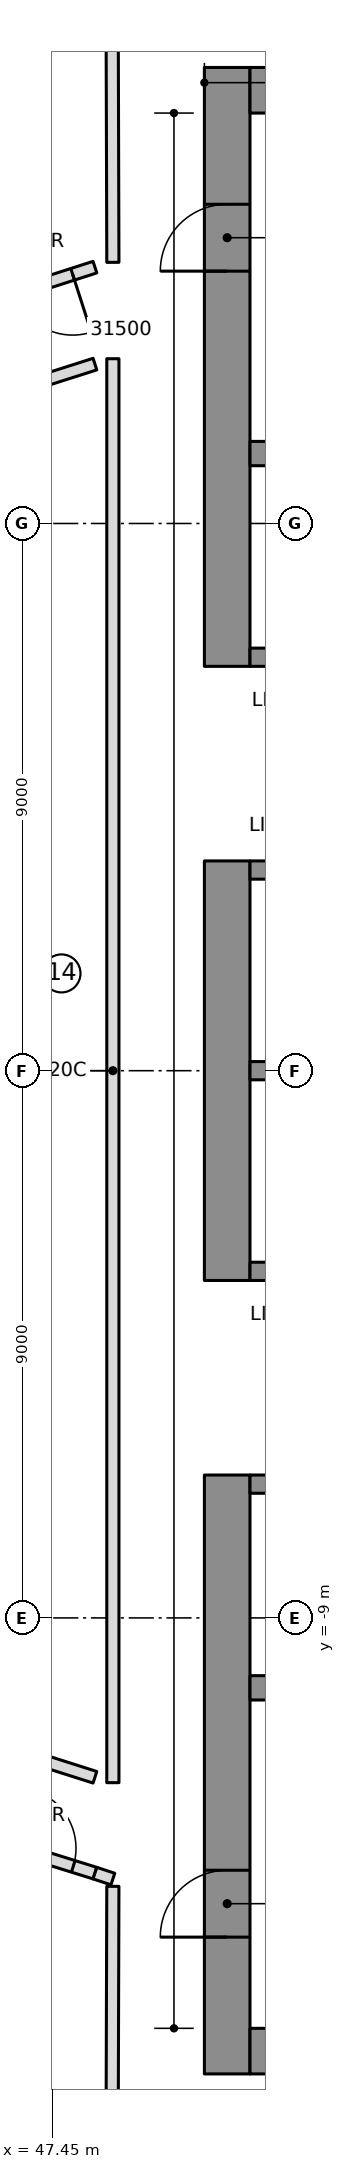
"""IFC4 building model, lengths in metres.
Left out: names, types, materials, properties, quantities, classifications, styles, units other than length and angle.
Written with IfcOpenShell. Run it as: python <this file> out.ifc"""

import sys

from ifc_helpers import new_model, si_unit, direction, frame, frame_2d, origin, place, context, subcontext, project, spatial, rectangle, extrude, element, fill, save


model = new_model("IFC4")
c1 = context("Model", 3, precision=1e-05, world=origin(), true_north=direction((0.0, 1.0)))
c2 = subcontext(c1, "Body", "Model", "MODEL_VIEW")
j1 = project(units=[si_unit("LENGTHUNIT", "METRE"), si_unit("PLANEANGLEUNIT", "RADIAN")], contexts=[c1])
p1 = place(None, origin())
s1 = spatial("IfcSite", under=j1, at=p1, CompositionType="ELEMENT")
p2 = place(p1, origin())
s2 = spatial("IfcBuilding", under=s1, at=p2, CompositionType="ELEMENT")
p3 = place(p2, frame((0.0, 0.0, 196.8)))
s3 = spatial("IfcBuildingStorey", under=s2, at=p3, CompositionType="ELEMENT", Elevation=196.8)
p4 = place(p3, frame((50.325, 6.65, 0.0), z_axis=(0.0, 0.0, 1.0), x_axis=(0.0, 1.0, 0.0)))
e1 = element("IfcWall", 1, at=p4, inside=s3, PredefinedType="SHEAR", context=c2, shape_type="SweptSolid", body=[
    extrude(rectangle(XDim=9.85, YDim=0.75, at=frame_2d((4.925, 0.0))), origin(), (0.0, 0.0, 1.0), 3.55),
])
p5 = place(p4, frame((6.5, 0.0, 0.0)))
e2 = element("IfcOpeningElement", 2, at=p5, cuts=e1, PredefinedType="OPENING", context=c2, shape_type="SweptSolid", body=[
    extrude(rectangle(XDim=1.1, YDim=2.1, at=frame_2d((0.55, 1.05))), frame((0.0, 0.385, 0.0), z_axis=(0.0, -1.0, 0.0), x_axis=(1.0, 0.0, 0.0)), (0.0, 0.0, 1.0), 0.77),
])
p6 = place(p3, frame((50.325, -3.45, 0.0), z_axis=(0.0, 0.0, 1.0), x_axis=(0.0, 1.0, 0.0)))
e3 = element("IfcWall", 3, at=p6, inside=s3, PredefinedType="SHEAR", context=c2, shape_type="SweptSolid", body=[
    extrude(rectangle(XDim=6.9, YDim=0.75, at=frame_2d((3.45, 0.0))), origin(), (0.0, 0.0, 1.0), 3.55),
])
p7 = place(p3, frame((50.325, -16.5, 0.0), z_axis=(0.0, 0.0, 1.0), x_axis=(0.0, 1.0, 0.0)))
e4 = element("IfcWall", 4, at=p7, inside=s3, PredefinedType="SHEAR", context=c2, shape_type="SweptSolid", body=[
    extrude(rectangle(XDim=9.85, YDim=0.75, at=frame_2d((4.925, 0.0))), origin(), (0.0, 0.0, 1.0), 3.55),
])
p8 = place(p7, frame((2.25, 0.0, 0.0)))
e5 = element("IfcOpeningElement", 5, at=p8, cuts=e4, PredefinedType="OPENING", context=c2, shape_type="SweptSolid", body=[
    extrude(rectangle(XDim=1.1, YDim=2.1, at=frame_2d((0.55, 1.05))), frame((0.0, 0.385, 0.0), z_axis=(0.0, -1.0, 0.0), x_axis=(1.0, 0.0, 0.0)), (0.0, 0.0, 1.0), 0.77),
])
for number, where, z_axis, x_axis in (
    (6, (50.7, 16.125, 0.0), (0.0, 0.0, 1.0), (1.0, 0.0, 0.0)),
    (7, (50.7, -16.125, 0.0), (0.0, 0.0, 1.0), (1.0, 0.0, 0.0)),
):
    element("IfcWall", number, at=place(p3, frame(where, z_axis=z_axis, x_axis=x_axis)), inside=s3, PredefinedType="SHEAR", context=c2, shape_type="SweptSolid", body=[
        extrude(rectangle(XDim=13.77, YDim=0.75, at=frame_2d((6.885, 0.0))), origin(), (0.0, 0.0, 1.0), 3.55),
    ])
p9 = place(p3, frame((50.7, 10.15, 0.0), z_axis=(0.0, 0.0, 1.0), x_axis=(1.0, 0.0, 0.0)))
e8 = element("IfcWall", 8, at=p9, inside=s3, PredefinedType="SHEAR", context=c2, shape_type="SweptSolid", body=[
    extrude(rectangle(XDim=13.02, YDim=0.4, at=frame_2d((6.51, 0.0))), origin(), (0.0, 0.0, 1.0), 3.55),
])
p10 = place(p9, frame((0.7, 0.0, 0.0)))
e9 = element("IfcOpeningElement", 9, at=p10, cuts=e8, PredefinedType="OPENING", context=c2, shape_type="SweptSolid", body=[
    extrude(rectangle(XDim=1.1, YDim=2.1, at=frame_2d((0.55, 1.05))), frame((0.0, 0.21, 0.0), z_axis=(0.0, -1.0, 0.0), x_axis=(1.0, 0.0, 0.0)), (0.0, 0.0, 1.0), 0.42),
])
p11 = place(p9, frame((3.5, 0.0, 0.0)))
e10 = element("IfcOpeningElement", 10, at=p11, cuts=e8, PredefinedType="OPENING", context=c2, shape_type="SweptSolid", body=[
    extrude(rectangle(XDim=1.1, YDim=2.1, at=frame_2d((0.55, 1.05))), frame((0.0, 0.21, 0.0), z_axis=(0.0, -1.0, 0.0), x_axis=(1.0, 0.0, 0.0)), (0.0, 0.0, 1.0), 0.42),
])
p12 = place(p3, frame((50.7, -10.15, 0.0), z_axis=(0.0, 0.0, 1.0), x_axis=(1.0, 0.0, 0.0)))
e11 = element("IfcWall", 11, at=p12, inside=s3, PredefinedType="SHEAR", context=c2, shape_type="SweptSolid", body=[
    extrude(rectangle(XDim=13.02, YDim=0.4, at=frame_2d((6.51, 0.0))), origin(), (0.0, 0.0, 1.0), 3.55),
])
p13 = place(p3, frame((50.7, 0.0, 0.0), z_axis=(0.0, 0.0, 1.0), x_axis=(1.0, 0.0, 0.0)))
e12 = element("IfcWall", 12, at=p13, inside=s3, PredefinedType="SHEAR", context=c2, shape_type="SweptSolid", body=[
    extrude(rectangle(XDim=10.9, YDim=0.3, at=frame_2d((5.45, 0.0))), origin(), (0.0, 0.0, 1.0), 3.55),
])
p14 = place(p3, frame((50.7, 3.3, 0.0), z_axis=(0.0, 0.0, 1.0), x_axis=(1.0, 0.0, 0.0)))
e13 = element("IfcWall", 13, at=p14, inside=s3, PredefinedType="SHEAR", context=c2, shape_type="SweptSolid", body=[
    extrude(rectangle(XDim=10.9, YDim=0.3, at=frame_2d((5.45, 0.0))), origin(), (0.0, 0.0, 1.0), 3.55),
])
p15 = place(p14, frame((0.7, 0.0, 0.0)))
e14 = element("IfcOpeningElement", 14, at=p15, cuts=e13, PredefinedType="OPENING", context=c2, shape_type="SweptSolid", body=[
    extrude(rectangle(XDim=1.1, YDim=2.1, at=frame_2d((0.55, 1.05))), frame((0.0, 0.16, 0.0), z_axis=(0.0, -1.0, 0.0), x_axis=(1.0, 0.0, 0.0)), (0.0, 0.0, 1.0), 0.32),
])
p16 = place(p14, frame((3.5, 0.0, 0.0)))
e15 = element("IfcOpeningElement", 15, at=p16, cuts=e13, PredefinedType="OPENING", context=c2, shape_type="SweptSolid", body=[
    extrude(rectangle(XDim=1.1, YDim=2.1, at=frame_2d((0.55, 1.05))), frame((0.0, 0.16, 0.0), z_axis=(0.0, -1.0, 0.0), x_axis=(1.0, 0.0, 0.0)), (0.0, 0.0, 1.0), 0.32),
])
p17 = place(p14, frame((6.3, 0.0, 0.0)))
e16 = element("IfcOpeningElement", 16, at=p17, cuts=e13, PredefinedType="OPENING", context=c2, shape_type="SweptSolid", body=[
    extrude(rectangle(XDim=1.1, YDim=2.1, at=frame_2d((0.55, 1.05))), frame((0.0, 0.16, 0.0), z_axis=(0.0, -1.0, 0.0), x_axis=(1.0, 0.0, 0.0)), (0.0, 0.0, 1.0), 0.32),
])
p18 = place(p14, frame((9.1, 0.0, 0.0)))
e17 = element("IfcOpeningElement", 17, at=p18, cuts=e13, PredefinedType="OPENING", context=c2, shape_type="SweptSolid", body=[
    extrude(rectangle(XDim=1.1, YDim=2.1, at=frame_2d((0.55, 1.05))), frame((0.0, 0.16, 0.0), z_axis=(0.0, -1.0, 0.0), x_axis=(1.0, 0.0, 0.0)), (0.0, 0.0, 1.0), 0.32),
])
p19 = place(p3, frame((50.7, 6.8, 0.0), z_axis=(0.0, 0.0, 1.0), x_axis=(1.0, 0.0, 0.0)))
e18 = element("IfcWall", 18, at=p19, inside=s3, PredefinedType="SHEAR", context=c2, shape_type="SweptSolid", body=[
    extrude(rectangle(XDim=10.9, YDim=0.3, at=frame_2d((5.45, 0.0))), origin(), (0.0, 0.0, 1.0), 3.55),
])
p20 = place(p19, frame((6.4, 0.0, 0.0)))
e19 = element("IfcOpeningElement", 19, at=p20, cuts=e18, PredefinedType="OPENING", context=c2, shape_type="SweptSolid", body=[
    extrude(rectangle(XDim=0.9, YDim=2.1, at=frame_2d((0.45, 1.05))), frame((0.0, 0.16, 0.0), z_axis=(0.0, -1.0, 0.0), x_axis=(1.0, 0.0, 0.0)), (0.0, 0.0, 1.0), 0.32),
])
p21 = place(p19, frame((9.2, 0.0, 0.0)))
e20 = element("IfcOpeningElement", 20, at=p21, cuts=e18, PredefinedType="OPENING", context=c2, shape_type="SweptSolid", body=[
    extrude(rectangle(XDim=0.9, YDim=2.1, at=frame_2d((0.45, 1.05))), frame((0.0, 0.16, 0.0), z_axis=(0.0, -1.0, 0.0), x_axis=(1.0, 0.0, 0.0)), (0.0, 0.0, 1.0), 0.32),
])
p22 = place(p3, frame((50.7, -3.3, 0.0), z_axis=(0.0, 0.0, 1.0), x_axis=(1.0, 0.0, 0.0)))
e21 = element("IfcWall", 21, at=p22, inside=s3, PredefinedType="SHEAR", context=c2, shape_type="SweptSolid", body=[
    extrude(rectangle(XDim=10.9, YDim=0.3, at=frame_2d((5.45, 0.0))), origin(), (0.0, 0.0, 1.0), 3.55),
])
p23 = place(p22, frame((9.1, 0.0, 0.0)))
e22 = element("IfcOpeningElement", 22, at=p23, cuts=e21, PredefinedType="OPENING", context=c2, shape_type="SweptSolid", body=[
    extrude(rectangle(XDim=1.1, YDim=2.1, at=frame_2d((0.55, 1.05))), frame((0.0, 0.16, 0.0), z_axis=(0.0, -1.0, 0.0), x_axis=(1.0, 0.0, 0.0)), (0.0, 0.0, 1.0), 0.32),
])
p24 = place(p3, frame((50.7, -6.8, 0.0), z_axis=(0.0, 0.0, 1.0), x_axis=(1.0, 0.0, 0.0)))
e23 = element("IfcWall", 23, at=p24, inside=s3, PredefinedType="SHEAR", context=c2, shape_type="SweptSolid", body=[
    extrude(rectangle(XDim=10.9, YDim=0.3, at=frame_2d((5.45, 0.0))), origin(), (0.0, 0.0, 1.0), 3.55),
])
p25 = place(p24, frame((6.3, 0.0, 0.0)))
e24 = element("IfcOpeningElement", 24, at=p25, cuts=e23, PredefinedType="OPENING", context=c2, shape_type="SweptSolid", body=[
    extrude(rectangle(XDim=1.1, YDim=2.1, at=frame_2d((0.55, 1.05))), frame((0.0, 0.16, 0.0), z_axis=(0.0, -1.0, 0.0), x_axis=(1.0, 0.0, 0.0)), (0.0, 0.0, 1.0), 0.32),
])
p26 = place(p24, frame((9.1, 0.0, 0.0)))
e25 = element("IfcOpeningElement", 25, at=p26, cuts=e23, PredefinedType="OPENING", context=c2, shape_type="SweptSolid", body=[
    extrude(rectangle(XDim=1.1, YDim=2.1, at=frame_2d((0.55, 1.05))), frame((0.0, 0.16, 0.0), z_axis=(0.0, -1.0, 0.0), x_axis=(1.0, 0.0, 0.0)), (0.0, 0.0, 1.0), 0.32),
])
p27 = place(p24, frame((0.8, 0.0, 0.0)))
e26 = element("IfcOpeningElement", 26, at=p27, cuts=e23, PredefinedType="OPENING", context=c2, shape_type="SweptSolid", body=[
    extrude(rectangle(XDim=0.9, YDim=2.1, at=frame_2d((0.45, 1.05))), frame((0.0, 0.16, 0.0), z_axis=(0.0, -1.0, 0.0), x_axis=(1.0, 0.0, 0.0)), (0.0, 0.0, 1.0), 0.32),
])
p28 = place(p24, frame((3.6, 0.0, 0.0)))
e27 = element("IfcOpeningElement", 27, at=p28, cuts=e23, PredefinedType="OPENING", context=c2, shape_type="SweptSolid", body=[
    extrude(rectangle(XDim=0.9, YDim=2.1, at=frame_2d((0.45, 1.05))), frame((0.0, 0.16, 0.0), z_axis=(0.0, -1.0, 0.0), x_axis=(1.0, 0.0, 0.0)), (0.0, 0.0, 1.0), 0.32),
])
p29 = place(p3, frame((48.15, 13.216, 0.0), z_axis=(0.0, 0.0, 1.0), x_axis=(-0.952101841283, -0.305781104428, 0.0)))
e28 = element("IfcWall", 28, at=p29, inside=s3, PredefinedType="PARTITIONING", context=c2, shape_type="SweptSolid", body=[
    extrude(rectangle(XDim=2.079, YDim=0.2, at=frame_2d((1.04, 0.0))), origin(), (0.0, 0.0, 1.0), 3.25),
])
p30 = place(p29, frame((0.385, 0.0, 0.0)))
e29 = element("IfcOpeningElement", 29, at=p30, cuts=e28, PredefinedType="OPENING", context=c2, shape_type="SweptSolid", body=[
    extrude(rectangle(XDim=1.0, YDim=2.1, at=frame_2d((0.5, 1.05))), frame((0.0, 0.11, 0.0), z_axis=(0.0, -1.0, 0.0), x_axis=(1.0, 0.0, 0.0)), (0.0, 0.0, 1.0), 0.22),
])
p31 = place(p3, frame((46.17, -12.58, 0.0), z_axis=(0.0, 0.0, 1.0), x_axis=(0.954639063921, -0.297765440634, 0.0)))
e30 = element("IfcWall", 30, at=p31, inside=s3, PredefinedType="PARTITIONING", context=c2, shape_type="SweptSolid", body=[
    extrude(rectangle(XDim=2.073, YDim=0.2, at=frame_2d((1.037, 0.0))), origin(), (0.0, 0.0, 1.0), 3.25),
])
p32 = place(p31, frame((0.7, 0.0, 0.0)))
e31 = element("IfcOpeningElement", 31, at=p32, cuts=e30, PredefinedType="OPENING", context=c2, shape_type="SweptSolid", body=[
    extrude(rectangle(XDim=1.0, YDim=2.1, at=frame_2d((0.5, 1.05))), frame((0.0, 0.11, 0.0), z_axis=(0.0, -1.0, 0.0), x_axis=(1.0, 0.0, 0.0)), (0.0, 0.0, 1.0), 0.22),
])
for number, where, z_axis, x_axis in (
    (32, (46.881, 11.217, 0.0), (0.0, 0.0, 1.0), (0.953, 0.304, 0.0)),
    (33, (48.15, -11.621, 0.0), (0.0, 0.0, 1.0), (-0.953, 0.304, 0.0)),
):
    element("IfcWall", number, at=place(p3, frame(where, z_axis=z_axis, x_axis=x_axis)), inside=s3, PredefinedType="PARTITIONING", context=c2, shape_type="SweptSolid", body=[
        extrude(rectangle(XDim=1.332, YDim=0.2, at=frame_2d((0.666, 0.0))), origin(), (0.0, 0.0, 1.0), 3.25),
    ])
p33 = place(p3, frame((48.445, 11.71, 0.0), z_axis=(0.0, 0.0, 1.0), x_axis=(0.0, -1.0, 0.0)))
e34 = element("IfcWall", 34, at=p33, inside=s3, PredefinedType="PARTITIONING", context=c2, shape_type="SweptSolid", body=[
    extrude(rectangle(XDim=23.42, YDim=0.2, at=frame_2d((11.71, 0.0))), origin(), (0.0, 0.0, 1.0), 3.25),
])
p34 = place(p3, frame((48.429, 18.816, 0.0), z_axis=(0.0, 0.0, 1.0), x_axis=(0.002918533604, -0.999995741072, 0.0)))
e35 = element("IfcWall", 35, at=p34, inside=s3, PredefinedType="PARTITIONING", context=c2, shape_type="SweptSolid", body=[
    extrude(rectangle(XDim=5.521, YDim=0.2, at=frame_2d((2.76, 0.0))), origin(), (0.0, 0.0, 1.0), 3.25),
])
p35 = place(p3, frame((48.15, -13.198, 0.0), z_axis=(0.0, 0.0, 1.0), x_axis=(0.949621636458, -0.313398703843, 0.0)))
e36 = element("IfcWall", 36, at=p35, inside=s3, PredefinedType="PARTITIONING", context=c2, shape_type="SweptSolid", body=[
    extrude(rectangle(XDim=0.311, YDim=0.2, at=frame_2d((0.155, 0.0))), origin(), (0.0, 0.0, 1.0), 3.25),
])
p36 = place(p3, frame((48.445, -13.415, 0.0), z_axis=(0.0, 0.0, 1.0), x_axis=(-0.002938106018, -0.999995683757, 0.0)))
e37 = element("IfcWall", 37, at=p36, inside=s3, PredefinedType="PARTITIONING", context=c2, shape_type="SweptSolid", body=[
    extrude(rectangle(XDim=5.401, YDim=0.2, at=frame_2d((2.701, 0.0))), origin(), (0.0, 0.0, 1.0), 3.25),
])
p37 = place(p30, origin())
e38 = element("IfcDoor", 38, at=p37, inside=s3, OperationType="SINGLE_SWING_RIGHT", PredefinedType="DOOR", context=c2, shape_type="SweptSolid", body=[
    extrude(rectangle(XDim=1.0, YDim=2.1, at=frame_2d((0.5, 1.05))), frame((0.0, 0.025, 0.0), z_axis=(0.0, -1.0, 0.0), x_axis=(1.0, 0.0, 0.0)), (0.0, 0.0, 1.0), 0.05),
])
fill(e29, e38)
p38 = place(p32, origin())
e39 = element("IfcDoor", 39, at=p38, inside=s3, OperationType="SINGLE_SWING_RIGHT", PredefinedType="DOOR", context=c2, shape_type="SweptSolid", body=[
    extrude(rectangle(XDim=1.0, YDim=2.1, at=frame_2d((0.5, 1.05))), frame((0.0, 0.025, 0.0), z_axis=(0.0, -1.0, 0.0), x_axis=(1.0, 0.0, 0.0)), (0.0, 0.0, 1.0), 0.05),
])
fill(e31, e39)
p39 = place(p5, origin())
e40 = element("IfcDoor", 40, at=p39, inside=s3, OperationType="SINGLE_SWING_RIGHT", PredefinedType="DOOR", context=c2, shape_type="SweptSolid", body=[
    extrude(rectangle(XDim=1.1, YDim=2.1, at=frame_2d((0.55, 1.05))), frame((0.0, 0.025, 0.0), z_axis=(0.0, -1.0, 0.0), x_axis=(1.0, 0.0, 0.0)), (0.0, 0.0, 1.0), 0.05),
])
fill(e2, e40)
p40 = place(p8, origin())
e41 = element("IfcDoor", 41, at=p40, inside=s3, OperationType="SINGLE_SWING_RIGHT", PredefinedType="DOOR", context=c2, shape_type="SweptSolid", body=[
    extrude(rectangle(XDim=1.1, YDim=2.1, at=frame_2d((0.55, 1.05))), frame((0.0, 0.025, 0.0), z_axis=(0.0, -1.0, 0.0), x_axis=(1.0, 0.0, 0.0)), (0.0, 0.0, 1.0), 0.05),
])
fill(e5, e41)
save(model, sys.argv[1])
